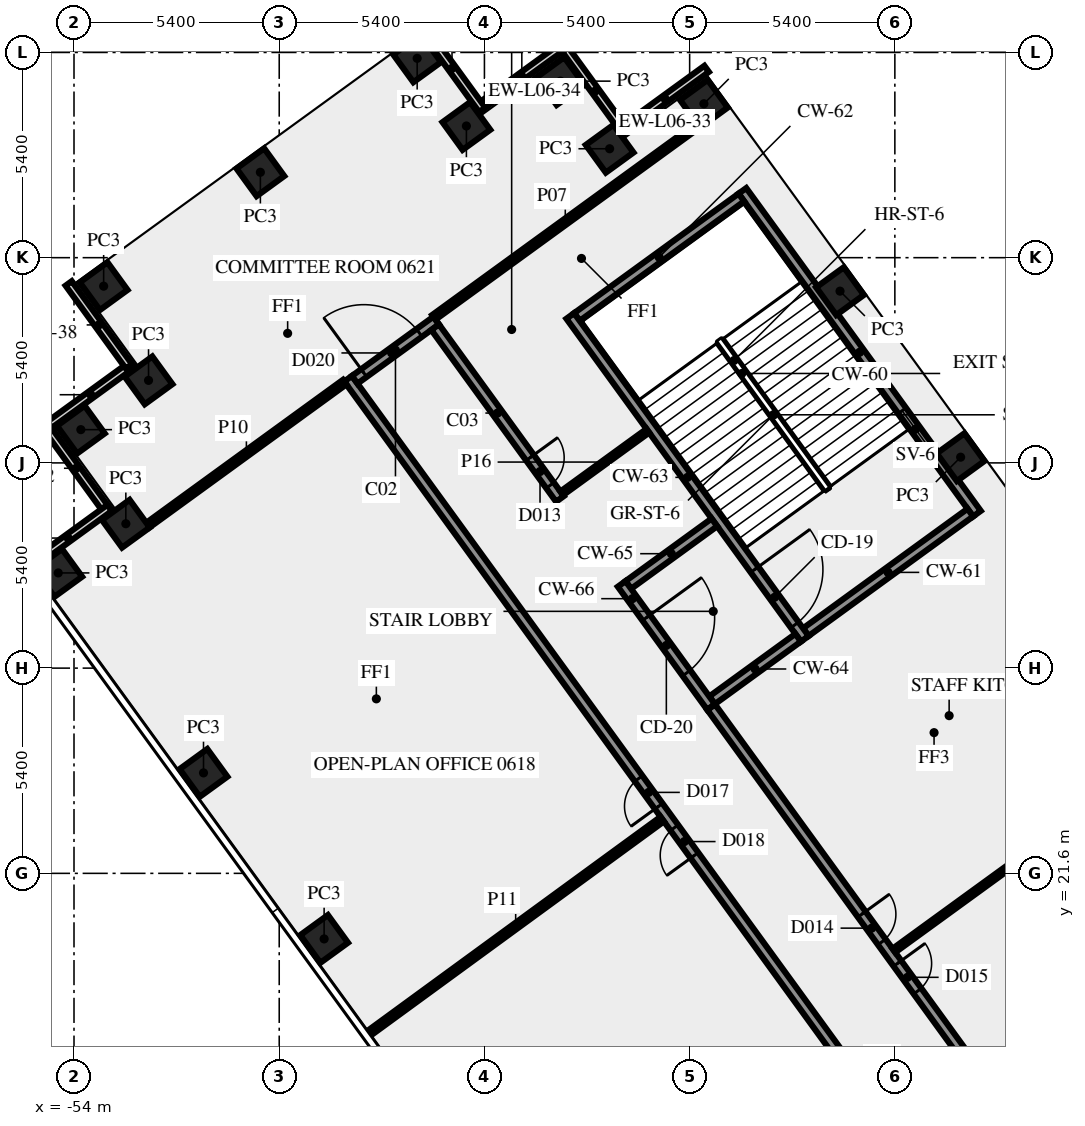
"""IFC4 building model, lengths in metres.
Left out: names, types, materials, properties, quantities, classifications, styles, units other than length and angle.
Written with IfcOpenShell. Run it as: python <this file> out.ifc"""

import sys

from ifc_helpers import new_model, si_unit, direction, frame, frame_2d, origin, origin_2d, place, context, subcontext, project, spatial, rectangle, extrude, element, fill, save


model = new_model("IFC4")
c1 = context("Model", 3, precision=1e-05, world=origin(), true_north=direction((0.0, 1.0)))
c2 = subcontext(c1, "Body", "Model", "MODEL_VIEW")
j1 = project(units=[si_unit("LENGTHUNIT", "METRE"), si_unit("PLANEANGLEUNIT", "RADIAN")], contexts=[c1])
p1 = place(None, origin())
s1 = spatial("IfcSite", under=j1, at=p1, CompositionType="ELEMENT")
p2 = place(p1, origin())
s2 = spatial("IfcBuilding", under=s1, at=p2, CompositionType="ELEMENT")
p3 = place(p2, frame((0.0, 0.0, 31.0)))
s3 = spatial("IfcBuildingStorey", under=s2, at=p3, CompositionType="ELEMENT", Elevation=31.0)
for number, where, z_axis, x_axis in (
    (1, (-30.669, 32.55, 0.0), (0.0, 0.0, 1.0), (-0.588, 0.809, 0.0)),
    (2, (-33.843, 36.919, 0.0), (0.0, 0.0, 1.0), (-0.588, 0.809, 0.0)),
    (3, (-37.425, 41.85, 0.0), (0.0, 0.0, 1.0), (-0.588, 0.809, 0.0)),
    (4, (-39.906, 40.666, 0.0), (0.0, 0.0, 1.0), (-0.588, 0.809, 0.0)),
    (5, (-41.2, 42.445, 0.0), (0.0, 0.0, 1.0), (-0.588, 0.809, 0.0)),
    (6, (-43.675, 41.265, 0.0), (0.0, 0.0, 1.0), (-0.809, -0.588, 0.0)),
    (7, (-44.97, 43.045, 0.0), (0.0, 0.0, 1.0), (-0.809, -0.588, 0.0)),
    (8, (-49.096, 40.047, 0.0), (0.0, 0.0, 1.0), (-0.809, -0.588, 0.0)),
    (9, (-53.22, 37.05, 0.0), (0.0, 0.0, 1.0), (0.588, -0.809, 0.0)),
    (10, (-52.039, 34.571, 0.0), (0.0, 0.0, 1.0), (-0.809, -0.588, 0.0)),
    (11, (-53.82, 33.275, 0.0), (0.0, 0.0, 1.0), (0.588, -0.809, 0.0)),
    (12, (-52.636, 30.8, 0.0), (0.0, 0.0, 1.0), (-0.809, -0.588, 0.0)),
    (13, (-54.415, 29.505, 0.0), (0.0, 0.0, 1.0), (0.588, -0.809, 0.0)),
    (14, (-50.592, 24.243, 0.0), (0.0, 0.0, 1.0), (0.588, -0.809, 0.0)),
    (15, (-47.418, 19.875, 0.0), (0.0, 0.0, 1.0), (0.588, -0.809, 0.0)),
):
    element("IfcColumn", number, at=place(p3, frame(where, z_axis=z_axis, x_axis=x_axis)), inside=s3, PredefinedType="COLUMN", context=c2, shape_type="SweptSolid", body=[
        extrude(rectangle(XDim=0.9, YDim=0.9, at=origin_2d()), origin(), (0.0, 0.0, 1.0), 3.65),
    ])
p4 = place(p3, frame((-52.465, 34.987, 0.0), z_axis=(0.0, 0.0, 1.0), x_axis=(-0.809033161865, -0.587762999008, 0.0)))
e16 = element("IfcWall", 16, at=p4, inside=s3, PredefinedType="SOLIDWALL", context=c2, shape_type="SweptSolid", body=[
    extrude(rectangle(XDim=2.7, YDim=0.2, at=frame_2d((1.35, 0.0))), origin(), (0.0, 0.0, 1.0), 3.65),
])
p5 = place(p3, frame((-54.738, 33.351, 0.0), z_axis=(0.0, 0.0, 1.0), x_axis=(0.587779184282, -0.809021403008, 0.0)))
e17 = element("IfcWall", 17, at=p5, inside=s3, PredefinedType="SOLIDWALL", context=c2, shape_type="SweptSolid", body=[
    extrude(rectangle(XDim=2.7, YDim=0.2, at=frame_2d((1.35, 0.0))), origin(), (0.0, 0.0, 1.0), 3.65),
])
for number, where, z_axis, x_axis in (
    (18, (-53.063, 31.216, 0.0), (0.0, 0.0, 1.0), (-0.809, -0.588, 0.0)),
    (19, (-37.353, 42.768, 0.0), (0.0, 0.0, 1.0), (-0.809, -0.588, 0.0)),
):
    element("IfcWall", number, at=place(p3, frame(where, z_axis=z_axis, x_axis=x_axis)), inside=s3, PredefinedType="SOLIDWALL", context=c2, shape_type="SweptSolid", body=[
        extrude(rectangle(XDim=2.7, YDim=0.2, at=frame_2d((1.35, 0.0))), origin(), (0.0, 0.0, 1.0), 3.65),
    ])
p6 = place(p3, frame((-39.488, 41.094, 0.0), z_axis=(0.0, 0.0, 1.0), x_axis=(-0.587806000234, 0.809001919707, 0.0)))
e20 = element("IfcWall", 20, at=p6, inside=s3, PredefinedType="SOLIDWALL", context=c2, shape_type="SweptSolid", body=[
    extrude(rectangle(XDim=2.7, YDim=0.2, at=frame_2d((1.35, 0.0))), origin(), (0.0, 0.0, 1.0), 3.65),
])
for number, where, z_axis, x_axis in (
    (21, (-41.124, 43.366, 0.0), (0.0, 0.0, 1.0), (-0.809, -0.588, 0.0)),
    (22, (-43.259, 41.691, 0.0), (0.0, 0.0, 1.0), (-0.588, 0.809, 0.0)),
    (23, (-54.14, 37.123, 0.0), (0.0, 0.0, 1.0), (0.588, -0.809, 0.0)),
):
    element("IfcWall", number, at=place(p3, frame(where, z_axis=z_axis, x_axis=x_axis)), inside=s3, PredefinedType="SOLIDWALL", context=c2, shape_type="SweptSolid", body=[
        extrude(rectangle(XDim=2.7, YDim=0.2, at=frame_2d((1.35, 0.0))), origin(), (0.0, 0.0, 1.0), 3.65),
    ])
p7 = place(p3, frame((-30.24, 31.064, 0.0), z_axis=(0.0, 0.0, 1.0), x_axis=(-0.587795589702, 0.809009483706, 0.0)))
e24 = element("IfcWall", 24, at=p7, inside=s3, PredefinedType="SHEAR", context=c2, shape_type="SweptSolid", body=[
    extrude(rectangle(XDim=10.5, YDim=0.25, at=frame_2d((5.25, 0.0))), origin(), (0.0, 0.0, 1.0), 3.65),
])
p8 = place(p7, frame((2.15, 0.0, 1.0)))
e25 = element("IfcOpeningElement", 25, at=p8, cuts=e24, PredefinedType="OPENING", context=c2, shape_type="SweptSolid", body=[
    extrude(rectangle(XDim=1.2, YDim=1.2, at=frame_2d((0.6, 0.6))), frame((0.0, 0.135, 0.0), z_axis=(0.0, -1.0, 0.0), x_axis=(1.0, 0.0, 0.0)), (0.0, 0.0, 1.0), 0.27),
])
p9 = place(p3, frame((-30.414, 31.092, 0.0), z_axis=(0.0, 0.0, 1.0), x_axis=(-0.8089984606, -0.587810760999, 0.0)))
e26 = element("IfcWall", 26, at=p9, inside=s3, PredefinedType="SHEAR", context=c2, shape_type="SweptSolid", body=[
    extrude(rectangle(XDim=5.35, YDim=0.25, at=frame_2d((2.675, 0.0))), origin(), (0.0, 0.0, 1.0), 3.65),
])
p10 = place(p3, frame((-36.439, 39.384, 0.0), z_axis=(0.0, 0.0, 1.0), x_axis=(-0.809020161303, -0.587780893365, 0.0)))
e27 = element("IfcWall", 27, at=p10, inside=s3, PredefinedType="SHEAR", context=c2, shape_type="SweptSolid", body=[
    extrude(rectangle(XDim=5.35, YDim=0.25, at=frame_2d((2.675, 0.0))), origin(), (0.0, 0.0, 1.0), 3.65),
])
p11 = place(p3, frame((-40.942, 36.267, 0.0), z_axis=(0.0, 0.0, 1.0), x_axis=(0.587795589702, -0.809009483706, 0.0)))
e28 = element("IfcWall", 28, at=p11, inside=s3, PredefinedType="SHEAR", context=c2, shape_type="SweptSolid", body=[
    extrude(rectangle(XDim=10.5, YDim=0.25, at=frame_2d((5.25, 0.0))), origin(), (0.0, 0.0, 1.0), 3.65),
])
p12 = place(p11, frame((8.25, 0.0, 0.0)))
e29 = element("IfcOpeningElement", 29, at=p12, cuts=e28, PredefinedType="OPENING", context=c2, shape_type="SweptSolid", body=[
    extrude(rectangle(XDim=1.8, YDim=2.1, at=frame_2d((0.9, 1.05))), frame((0.0, 0.135, 0.0), z_axis=(0.0, -1.0, 0.0), x_axis=(1.0, 0.0, 0.0)), (0.0, 0.0, 1.0), 0.27),
])
for number, where, z_axis, x_axis in (
    (30, (-34.945, 27.8, 0.0), (0.0, 0.0, 1.0), (-0.809, -0.588, 0.0)),
    (31, (-37.149, 30.834, 0.0), (0.0, 0.0, 1.0), (-0.809, -0.588, 0.0)),
):
    element("IfcWall", number, at=place(p3, frame(where, z_axis=z_axis, x_axis=x_axis)), inside=s3, PredefinedType="SHEAR", context=c2, shape_type="SweptSolid", body=[
        extrude(rectangle(XDim=2.8, YDim=0.25, at=frame_2d((1.4, 0.0))), origin(), (0.0, 0.0, 1.0), 3.65),
    ])
p13 = place(p3, frame((-39.589, 29.216, 0.0), z_axis=(0.0, 0.0, 1.0), x_axis=(0.587772420479, -0.809026317077, 0.0)))
e32 = element("IfcWall", 32, at=p13, inside=s3, PredefinedType="SHEAR", context=c2, shape_type="SweptSolid", body=[
    extrude(rectangle(XDim=4.0, YDim=0.25, at=frame_2d((2.0, 0.0))), origin(), (0.0, 0.0, 1.0), 3.65),
])
p14 = place(p13, frame((1.1, 0.0, 0.0)))
e33 = element("IfcOpeningElement", 33, at=p14, cuts=e32, PredefinedType="OPENING", context=c2, shape_type="SweptSolid", body=[
    extrude(rectangle(XDim=1.8, YDim=2.1, at=frame_2d((0.9, 1.05))), frame((0.0, 0.135, 0.0), z_axis=(0.0, -1.0, 0.0), x_axis=(1.0, 0.0, 0.0)), (0.0, 0.0, 1.0), 0.27),
])
p15 = place(p3, frame((-20.531, -1.523, 0.0), z_axis=(0.0, 0.0, 1.0), x_axis=(-0.587784593204, 0.809017473231, 0.0)))
e34 = element("IfcWall", 34, at=p15, inside=s3, PredefinedType="SOLIDWALL", context=c2, shape_type="SweptSolid", body=[
    extrude(rectangle(XDim=44.67, YDim=0.25, at=frame_2d((22.335, 0.0))), origin(), (0.0, 0.0, 1.0), 3.65),
])
p16 = place(p15, frame((30.765, 0.0, 0.0)))
e35 = element("IfcOpeningElement", 35, at=p16, cuts=e34, PredefinedType="OPENING", context=c2, shape_type="SweptSolid", body=[
    extrude(rectangle(XDim=0.9, YDim=2.1, at=frame_2d((0.45, 1.05))), frame((0.0, 0.135, 0.0), z_axis=(0.0, -1.0, 0.0), x_axis=(1.0, 0.0, 0.0)), (0.0, 0.0, 1.0), 0.27),
])
p17 = place(p15, frame((14.316, 0.0, 0.0)))
e36 = element("IfcOpeningElement", 36, at=p17, cuts=e34, PredefinedType="OPENING", context=c2, shape_type="SweptSolid", body=[
    extrude(rectangle(XDim=0.9, YDim=2.1, at=frame_2d((0.45, 1.05))), frame((0.0, 0.135, 0.0), z_axis=(0.0, -1.0, 0.0), x_axis=(1.0, 0.0, 0.0)), (0.0, 0.0, 1.0), 0.27),
])
p18 = place(p15, frame((29.166, 0.0, 0.0)))
e37 = element("IfcOpeningElement", 37, at=p18, cuts=e34, PredefinedType="OPENING", context=c2, shape_type="SweptSolid", body=[
    extrude(rectangle(XDim=0.9, YDim=2.1, at=frame_2d((0.45, 1.05))), frame((0.0, 0.135, 0.0), z_axis=(0.0, -1.0, 0.0), x_axis=(1.0, 0.0, 0.0)), (0.0, 0.0, 1.0), 0.27),
])
p19 = place(p3, frame((-46.613, 34.588, 0.0), z_axis=(0.0, 0.0, 1.0), x_axis=(0.808994936898, 0.587815610607, 0.0)))
e38 = element("IfcWall", 38, at=p19, inside=s3, PredefinedType="SOLIDWALL", context=c2, shape_type="SweptSolid", body=[
    extrude(rectangle(XDim=2.65, YDim=0.25, at=frame_2d((1.325, 0.0))), origin(), (0.0, 0.0, 1.0), 3.65),
])
p20 = place(p19, frame((0.299, 0.0, 0.0)))
e39 = element("IfcOpeningElement", 39, at=p20, cuts=e38, PredefinedType="OPENING", context=c2, shape_type="SweptSolid", body=[
    extrude(rectangle(XDim=1.8, YDim=2.1, at=frame_2d((0.9, 1.05))), frame((0.0, 0.135, 0.0), z_axis=(0.0, -1.0, 0.0), x_axis=(1.0, 0.0, 0.0)), (0.0, 0.0, 1.0), 0.27),
])
p21 = place(p3, frame((-44.497, 35.971, 0.0), z_axis=(0.0, 0.0, 1.0), x_axis=(0.587742866856, -0.809047787501, 0.0)))
e40 = element("IfcWall", 40, at=p21, inside=s3, PredefinedType="SOLIDWALL", context=c2, shape_type="SweptSolid", body=[
    extrude(rectangle(XDim=5.586, YDim=0.25, at=frame_2d((2.793, 0.0))), origin(), (0.0, 0.0, 1.0), 3.65),
])
p22 = place(p21, frame((4.245, 0.0, 0.0)))
e41 = element("IfcOpeningElement", 41, at=p22, cuts=e40, PredefinedType="OPENING", context=c2, shape_type="SweptSolid", body=[
    extrude(rectangle(XDim=0.9, YDim=2.1, at=frame_2d((0.45, 1.05))), frame((0.0, 0.135, 0.0), z_axis=(0.0, -1.0, 0.0), x_axis=(1.0, 0.0, 0.0)), (0.0, 0.0, 1.0), 0.27),
])
p23 = place(p3, frame((-37.232, 25.972, 0.0), z_axis=(0.0, 0.0, 1.0), x_axis=(0.587786323093, -0.809016216391, 0.0)))
e42 = element("IfcWall", 42, at=p23, inside=s3, PredefinedType="SOLIDWALL", context=c2, shape_type="SweptSolid", body=[
    extrude(rectangle(XDim=33.493, YDim=0.25, at=frame_2d((16.747, 0.0))), origin(), (0.0, 0.0, 1.0), 3.65),
])
p24 = place(p23, frame((8.335, 0.0, 0.0)))
e43 = element("IfcOpeningElement", 43, at=p24, cuts=e42, PredefinedType="OPENING", context=c2, shape_type="SweptSolid", body=[
    extrude(rectangle(XDim=0.9, YDim=2.1, at=frame_2d((0.45, 1.05))), frame((0.0, 0.135, 0.0), z_axis=(0.0, -1.0, 0.0), x_axis=(1.0, 0.0, 0.0)), (0.0, 0.0, 1.0), 0.27),
])
p25 = place(p23, frame((29.152, 0.0, 0.0)))
e44 = element("IfcOpeningElement", 44, at=p25, cuts=e42, PredefinedType="OPENING", context=c2, shape_type="SweptSolid", body=[
    extrude(rectangle(XDim=0.9, YDim=2.1, at=frame_2d((0.45, 1.05))), frame((0.0, 0.135, 0.0), z_axis=(0.0, -1.0, 0.0), x_axis=(1.0, 0.0, 0.0)), (0.0, 0.0, 1.0), 0.27),
])
p26 = place(p23, frame((6.735, 0.0, 0.0)))
e45 = element("IfcOpeningElement", 45, at=p26, cuts=e42, PredefinedType="OPENING", context=c2, shape_type="SweptSolid", body=[
    extrude(rectangle(XDim=0.9, YDim=2.1, at=frame_2d((0.45, 1.05))), frame((0.0, 0.135, 0.0), z_axis=(0.0, -1.0, 0.0), x_axis=(1.0, 0.0, 0.0)), (0.0, 0.0, 1.0), 0.27),
])
p27 = place(p3, frame((-37.614, 41.257, 0.0), z_axis=(0.0, 0.0, 1.0), x_axis=(-0.808991595707, -0.587820208972, 0.0)))
e46 = element("IfcWall", 46, at=p27, inside=s3, PredefinedType="PARTITIONING", context=c2, shape_type="SweptSolid", body=[
    extrude(rectangle(XDim=8.551, YDim=0.15, at=frame_2d((4.275, 0.0))), origin(), (0.0, 0.0, 1.0), 3.65),
])
p28 = place(p3, frame((-24.618, 25.242, 0.0), z_axis=(0.0, 0.0, 1.0), x_axis=(-0.809002920164, -0.587804623294, 0.0)))
e47 = element("IfcWall", 47, at=p28, inside=s3, PredefinedType="PARTITIONING", context=c2, shape_type="SweptSolid", body=[
    extrude(rectangle(XDim=9.651, YDim=0.12, at=frame_2d((4.825, 0.0))), origin(), (0.0, 0.0, 1.0), 2.75),
])
p29 = place(p3, frame((-46.877, 34.526, 0.0), z_axis=(0.0, 0.0, 1.0), x_axis=(-0.808993566199, -0.587817497059, 0.0)))
e48 = element("IfcWall", 48, at=p29, inside=s3, PredefinedType="PARTITIONING", context=c2, shape_type="SweptSolid", body=[
    extrude(rectangle(XDim=6.395, YDim=0.15, at=frame_2d((3.197, 0.0))), origin(), (0.0, 0.0, 1.0), 3.65),
])
p30 = place(p3, frame((-46.234, 17.394, 0.0), z_axis=(0.0, 0.0, 1.0), x_axis=(0.807606997933, 0.589721067023, 0.0)))
e49 = element("IfcWall", 49, at=p30, inside=s3, PredefinedType="PARTITIONING", context=c2, shape_type="SweptSolid", body=[
    extrude(rectangle(XDim=9.55, YDim=0.15, at=frame_2d((4.775, 0.0))), origin(), (0.0, 0.0, 1.0), 2.75),
])
p31 = place(p3, frame((-41.166, 31.599, 0.0), z_axis=(0.0, 0.0, 1.0), x_axis=(0.809090262332, 0.587684394381, 0.0)))
e50 = element("IfcWall", 50, at=p31, inside=s3, PredefinedType="PARTITIONING", context=c2, shape_type="SweptSolid", body=[
    extrude(rectangle(XDim=2.801, YDim=0.12, at=frame_2d((1.4, 0.0))), origin(), (0.0, 0.0, 1.0), 3.65),
])
p32 = place(p8, origin())
e51 = element("IfcWindow", 51, at=p32, inside=s3, PartitioningType="SINGLE_PANEL", PredefinedType="WINDOW", context=c2, shape_type="SweptSolid", body=[
    extrude(rectangle(XDim=1.2, YDim=1.2, at=frame_2d((0.6, 0.6))), frame((0.0, 0.03, 0.0), z_axis=(0.0, -1.0, 0.0), x_axis=(1.0, 0.0, 0.0)), (0.0, 0.0, 1.0), 0.06),
])
fill(e25, e51)
p33 = place(p12, origin())
e52 = element("IfcDoor", 52, at=p33, inside=s3, OperationType="DOUBLE_DOOR_SINGLE_SWING", PredefinedType="DOOR", context=c2, shape_type="SweptSolid", body=[
    extrude(rectangle(XDim=1.8, YDim=2.1, at=frame_2d((0.9, 1.05))), frame((0.0, 0.025, 0.0), z_axis=(0.0, -1.0, 0.0), x_axis=(1.0, 0.0, 0.0)), (0.0, 0.0, 1.0), 0.05),
])
fill(e29, e52)
p34 = place(p14, origin())
e53 = element("IfcDoor", 53, at=p34, inside=s3, OperationType="DOUBLE_DOOR_SINGLE_SWING", PredefinedType="DOOR", context=c2, shape_type="SweptSolid", body=[
    extrude(rectangle(XDim=1.8, YDim=2.1, at=frame_2d((0.9, 1.05))), frame((0.0, 0.025, 0.0), z_axis=(0.0, -1.0, 0.0), x_axis=(1.0, 0.0, 0.0)), (0.0, 0.0, 1.0), 0.05),
])
fill(e33, e53)
p35 = place(p22, origin())
e54 = element("IfcDoor", 54, at=p35, inside=s3, OperationType="SINGLE_SWING_RIGHT", PredefinedType="DOOR", context=c2, shape_type="SweptSolid", body=[
    extrude(rectangle(XDim=0.9, YDim=2.1, at=frame_2d((0.45, 1.05))), frame((0.0, 0.025, 0.0), z_axis=(0.0, -1.0, 0.0), x_axis=(1.0, 0.0, 0.0)), (0.0, 0.0, 1.0), 0.05),
])
fill(e41, e54)
p36 = place(p24, origin())
e55 = element("IfcDoor", 55, at=p36, inside=s3, OperationType="SINGLE_SWING_LEFT", PredefinedType="DOOR", context=c2, shape_type="SweptSolid", body=[
    extrude(rectangle(XDim=0.9, YDim=2.1, at=frame_2d((0.45, 1.05))), frame((0.0, 0.025, 0.0), z_axis=(0.0, -1.0, 0.0), x_axis=(1.0, 0.0, 0.0)), (0.0, 0.0, 1.0), 0.05),
])
fill(e43, e55)
p37 = place(p16, origin())
e56 = element("IfcDoor", 56, at=p37, inside=s3, OperationType="SINGLE_SWING_LEFT", PredefinedType="DOOR", context=c2, shape_type="SweptSolid", body=[
    extrude(rectangle(XDim=0.9, YDim=2.1, at=frame_2d((0.45, 1.05))), frame((0.0, 0.025, 0.0), z_axis=(0.0, -1.0, 0.0), x_axis=(1.0, 0.0, 0.0)), (0.0, 0.0, 1.0), 0.05),
])
fill(e35, e56)
p38 = place(p20, origin())
e57 = element("IfcDoor", 57, at=p38, inside=s3, OperationType="DOUBLE_DOOR_SINGLE_SWING", PredefinedType="DOOR", context=c2, shape_type="SweptSolid", body=[
    extrude(rectangle(XDim=1.8, YDim=2.1, at=frame_2d((0.9, 1.05))), frame((0.0, 0.025, 0.0), z_axis=(0.0, -1.0, 0.0), x_axis=(1.0, 0.0, 0.0)), (0.0, 0.0, 1.0), 0.05),
])
fill(e39, e57)
p39 = place(p18, origin())
e58 = element("IfcDoor", 58, at=p39, inside=s3, OperationType="SINGLE_SWING_RIGHT", PredefinedType="DOOR", context=c2, shape_type="SweptSolid", body=[
    extrude(rectangle(XDim=0.9, YDim=2.1, at=frame_2d((0.45, 1.05))), frame((0.0, 0.025, 0.0), z_axis=(0.0, -1.0, 0.0), x_axis=(1.0, 0.0, 0.0)), (0.0, 0.0, 1.0), 0.05),
])
fill(e37, e58)
p40 = place(p26, origin())
e59 = element("IfcDoor", 59, at=p40, inside=s3, OperationType="SINGLE_SWING_RIGHT", PredefinedType="DOOR", context=c2, shape_type="SweptSolid", body=[
    extrude(rectangle(XDim=0.9, YDim=2.1, at=frame_2d((0.45, 1.05))), frame((0.0, 0.025, 0.0), z_axis=(0.0, -1.0, 0.0), x_axis=(1.0, 0.0, 0.0)), (0.0, 0.0, 1.0), 0.05),
])
fill(e45, e59)
save(model, sys.argv[1])
